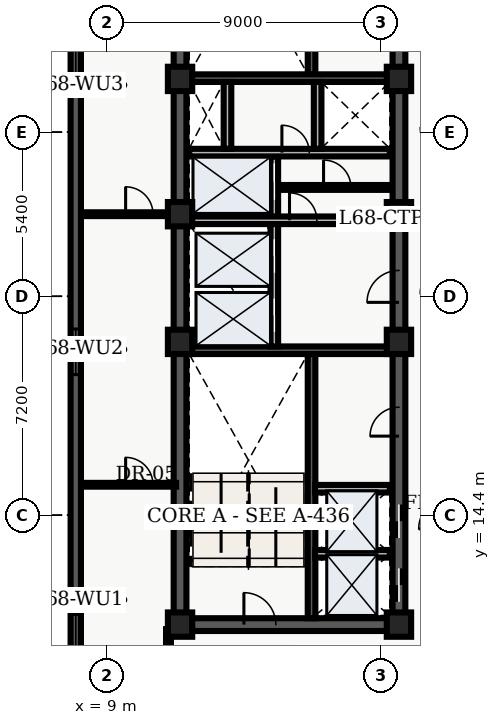
"""IFC4 building model, lengths in metres.
Left out: names, types, materials, properties, quantities, classifications, styles, units other than length and angle.
Written with IfcOpenShell. Run it as: python <this file> out.ifc"""

import sys

from ifc_helpers import new_model, entity, si_unit, converted_unit, direction, frame, origin_with_axes, origin_2d_with_axis, place, context, subcontext, project, spatial, polyline, rectangle, outline, extrude, element, fill, save


model = new_model("IFC4")
c1 = context("Model", 3, precision=1e-05, world=origin_with_axes(), true_north=direction((0.0, 1.0)))
c2 = subcontext(c1, "Body", "Model", "MODEL_VIEW")
j1 = project(units=[si_unit("LENGTHUNIT", "METRE"), converted_unit("PLANEANGLEUNIT", "DEGREE", entity("IfcPlaneAngleMeasure", 0.017), si_unit("PLANEANGLEUNIT", "RADIAN"), dimensions=[0, 0, 0, 0, 0, 0, 0])], contexts=[c1])
p1 = place(None, origin_with_axes())
s1 = spatial("IfcSite", under=j1, at=p1, CompositionType="ELEMENT")
p2 = place(p1, origin_with_axes())
s2 = spatial("IfcBuilding", under=s1, at=p2, CompositionType="ELEMENT")
p3 = place(p2, frame((0.0, 0.0, 276.3), z_axis=(0.0, 0.0, 1.0), x_axis=(1.0, 0.0, 0.0)))
s3 = spatial("IfcBuildingStorey", under=s2, at=p3, CompositionType="ELEMENT", Elevation=276.3)
p4 = place(p3, frame((11.4, 10.8, 0.0), z_axis=(0.0, 0.0, 1.0), x_axis=(0.0, 1.0, 0.0)))
e1 = element("IfcWall", 1, at=p4, inside=s3, PredefinedType="SHEAR", context=c2, shape_type="SweptSolid", body=[
    extrude(outline(polyline([(0.0, -0.21), (27.0, -0.21), (27.0, 0.21), (0.0, 0.21), (0.0, -0.21)])), origin_with_axes(), (0.0, 0.0, 1.0), 3.66),
])
p5 = place(p3, frame((11.4, 10.8, 0.0), z_axis=(0.0, 0.0, 1.0), x_axis=(1.0, 0.0, 0.0)))
e2 = element("IfcWall", 2, at=p5, inside=s3, PredefinedType="SHEAR", context=c2, shape_type="SweptSolid", body=[
    extrude(outline(polyline([(0.0, -0.21), (7.2, -0.21), (7.2, 0.21), (0.0, 0.21), (0.0, -0.21)])), origin_with_axes(), (0.0, 0.0, 1.0), 3.66),
])
p6 = place(p5, frame((2.625, 0.0, 0.0), z_axis=(0.0, 0.0, 1.0), x_axis=(1.0, 0.0, 0.0)))
e3 = element("IfcOpeningElement", 3, at=p6, cuts=e2, PredefinedType="OPENING", context=c2, shape_type="SweptSolid", body=[
    extrude(rectangle(XDim=1.05, YDim=0.44, at=origin_2d_with_axis()), origin_with_axes(), (0.0, 0.0, 1.0), 2.15),
])
p7 = place(p3, frame((18.6, 10.8, 0.0), z_axis=(0.0, 0.0, 1.0), x_axis=(0.0, 1.0, 0.0)))
e4 = element("IfcWall", 4, at=p7, inside=s3, PredefinedType="SHEAR", context=c2, shape_type="SweptSolid", body=[
    extrude(outline(polyline([(0.0, -0.21), (13.5, -0.21), (13.5, 0.21), (0.0, 0.21), (0.0, -0.21)])), origin_with_axes(), (0.0, 0.0, 1.0), 3.66),
])
p8 = place(p7, frame((1.3, 0.0, 0.0), z_axis=(0.0, 0.0, 1.0), x_axis=(1.0, 0.0, 0.0)))
e5 = element("IfcOpeningElement", 5, at=p8, cuts=e4, PredefinedType="OPENING", context=c2, shape_type="SweptSolid", body=[
    extrude(rectangle(XDim=1.1, YDim=0.44, at=origin_2d_with_axis()), origin_with_axes(), (0.0, 0.0, 1.0), 2.15),
])
p9 = place(p7, frame((3.4, 0.0, 0.0), z_axis=(0.0, 0.0, 1.0), x_axis=(1.0, 0.0, 0.0)))
e6 = element("IfcOpeningElement", 6, at=p9, cuts=e4, PredefinedType="OPENING", context=c2, shape_type="SweptSolid", body=[
    extrude(rectangle(XDim=1.1, YDim=0.44, at=origin_2d_with_axis()), origin_with_axes(), (0.0, 0.0, 1.0), 2.15),
])
p10 = place(p7, frame((11.125, 0.0, 0.0), z_axis=(0.0, 0.0, 1.0), x_axis=(1.0, 0.0, 0.0)))
e7 = element("IfcOpeningElement", 7, at=p10, cuts=e4, PredefinedType="OPENING", context=c2, shape_type="SweptSolid", body=[
    extrude(rectangle(XDim=1.05, YDim=0.44, at=origin_2d_with_axis()), origin_with_axes(), (0.0, 0.0, 1.0), 2.15),
])
p11 = place(p7, frame((6.675, 0.0, 0.0), z_axis=(0.0, 0.0, 1.0), x_axis=(1.0, 0.0, 0.0)))
e8 = element("IfcOpeningElement", 8, at=p11, cuts=e4, PredefinedType="OPENING", context=c2, shape_type="SweptSolid", body=[
    extrude(rectangle(XDim=0.95, YDim=0.44, at=origin_2d_with_axis()), origin_with_axes(), (0.0, 0.0, 1.0), 2.15),
])
p12 = place(p3, frame((18.6, 24.3, 0.0), z_axis=(0.0, 0.0, 1.0), x_axis=(0.0, 1.0, 0.0)))
e9 = element("IfcWall", 9, at=p12, inside=s3, PredefinedType="SHEAR", context=c2, shape_type="SweptSolid", body=[
    extrude(outline(polyline([(0.0, -0.21), (13.5, -0.21), (13.5, 0.21), (0.0, 0.21), (0.0, -0.21)])), origin_with_axes(), (0.0, 0.0, 1.0), 3.66),
])
p13 = place(p12, frame((6.275, 0.0, 0.0), z_axis=(0.0, 0.0, 1.0), x_axis=(1.0, 0.0, 0.0)))
e10 = element("IfcOpeningElement", 10, at=p13, cuts=e9, PredefinedType="OPENING", context=c2, shape_type="SweptSolid", body=[
    extrude(rectangle(XDim=0.95, YDim=0.44, at=origin_2d_with_axis()), origin_with_axes(), (0.0, 0.0, 1.0), 2.15),
])
p14 = place(p12, frame((10.875, 0.0, 0.0), z_axis=(0.0, 0.0, 1.0), x_axis=(1.0, 0.0, 0.0)))
e11 = element("IfcOpeningElement", 11, at=p14, cuts=e9, PredefinedType="OPENING", context=c2, shape_type="SweptSolid", body=[
    extrude(rectangle(XDim=0.95, YDim=0.44, at=origin_2d_with_axis()), origin_with_axes(), (0.0, 0.0, 1.0), 2.15),
])
p15 = place(p3, frame((15.725, 11.01, 0.0), z_axis=(0.0, 0.0, 1.0), x_axis=(0.0, 1.0, 0.0)))
e12 = element("IfcWall", 12, at=p15, inside=s3, PredefinedType="SHEAR", context=c2, shape_type="SweptSolid", body=[
    extrude(outline(polyline([(0.0, -0.125), (8.69, -0.125), (8.69, 0.125), (0.0, 0.125), (0.0, -0.125)])), origin_with_axes(), (0.0, 0.0, 1.0), 3.66),
])
p16 = place(p3, frame((11.61, 19.825, 0.0), z_axis=(0.0, 0.0, 1.0), x_axis=(1.0, 0.0, 0.0)))
e13 = element("IfcWall", 13, at=p16, inside=s3, PredefinedType="SHEAR", context=c2, shape_type="SweptSolid", body=[
    extrude(outline(polyline([(0.0, -0.125), (6.78, -0.125), (6.78, 0.125), (0.0, 0.125), (0.0, -0.125)])), origin_with_axes(), (0.0, 0.0, 1.0), 3.66),
])
p17 = place(p3, frame((15.725, 28.9, 0.0), z_axis=(0.0, 0.0, 1.0), x_axis=(0.0, 1.0, 0.0)))
e14 = element("IfcWall", 14, at=p17, inside=s3, PredefinedType="SHEAR", context=c2, shape_type="SweptSolid", body=[
    extrude(outline(polyline([(0.0, -0.125), (8.69, -0.125), (8.69, 0.125), (0.0, 0.125), (0.0, -0.125)])), origin_with_axes(), (0.0, 0.0, 1.0), 3.66),
])
p18 = place(p3, frame((11.61, 28.775, 0.0), z_axis=(0.0, 0.0, 1.0), x_axis=(1.0, 0.0, 0.0)))
e15 = element("IfcWall", 15, at=p18, inside=s3, PredefinedType="SHEAR", context=c2, shape_type="SweptSolid", body=[
    extrude(outline(polyline([(0.0, -0.125), (6.78, -0.125), (6.78, 0.125), (0.0, 0.125), (0.0, -0.125)])), origin_with_axes(), (0.0, 0.0, 1.0), 3.66),
])
p19 = place(p3, frame((14.5, 19.95, 0.0), z_axis=(0.0, 0.0, 1.0), x_axis=(0.0, 1.0, 0.0)))
e16 = element("IfcWall", 16, at=p19, inside=s3, PredefinedType="SOLIDWALL", context=c2, shape_type="SweptSolid", body=[
    extrude(outline(polyline([(0.0, -0.125), (6.25, -0.125), (6.25, 0.125), (0.0, 0.125), (0.0, -0.125)])), origin_with_axes(), (0.0, 0.0, 1.0), 2.7),
])
p20 = place(p19, frame((1.025, 0.0, 0.0), z_axis=(0.0, 0.0, 1.0), x_axis=(1.0, 0.0, 0.0)))
e17 = element("IfcOpeningElement", 17, at=p20, cuts=e16, PredefinedType="OPENING", context=c2, shape_type="SweptSolid", body=[
    extrude(rectangle(XDim=1.1, YDim=0.27, at=origin_2d_with_axis()), origin_with_axes(), (0.0, 0.0, 1.0), 2.15),
])
p21 = place(p19, frame((2.975, 0.0, 0.0), z_axis=(0.0, 0.0, 1.0), x_axis=(1.0, 0.0, 0.0)))
e18 = element("IfcOpeningElement", 18, at=p21, cuts=e16, PredefinedType="OPENING", context=c2, shape_type="SweptSolid", body=[
    extrude(rectangle(XDim=1.1, YDim=0.27, at=origin_2d_with_axis()), origin_with_axes(), (0.0, 0.0, 1.0), 2.15),
])
p22 = place(p19, frame((5.425, 0.0, 0.0), z_axis=(0.0, 0.0, 1.0), x_axis=(1.0, 0.0, 0.0)))
e19 = element("IfcOpeningElement", 19, at=p22, cuts=e16, PredefinedType="OPENING", context=c2, shape_type="SweptSolid", body=[
    extrude(rectangle(XDim=1.2, YDim=0.27, at=origin_2d_with_axis()), origin_with_axes(), (0.0, 0.0, 1.0), 2.15),
])
p23 = place(p3, frame((11.7, 24.1, 0.0), z_axis=(0.0, 0.0, 1.0), x_axis=(1.0, 0.0, 0.0)))
e20 = element("IfcWall", 20, at=p23, inside=s3, PredefinedType="SOLIDWALL", context=c2, shape_type="SweptSolid", body=[
    extrude(outline(polyline([(0.0, -0.125), (6.6, -0.125), (6.6, 0.125), (0.0, 0.125), (0.0, -0.125)])), origin_with_axes(), (0.0, 0.0, 1.0), 2.7),
])
p24 = place(p23, frame((3.75, 0.0, 0.0), z_axis=(0.0, 0.0, 1.0), x_axis=(1.0, 0.0, 0.0)))
e21 = element("IfcOpeningElement", 21, at=p24, cuts=e20, PredefinedType="OPENING", context=c2, shape_type="SweptSolid", body=[
    extrude(rectangle(XDim=0.9, YDim=0.27, at=origin_2d_with_axis()), origin_with_axes(), (0.0, 0.0, 1.0), 2.15),
])
p25 = place(p3, frame((11.7, 26.325, 0.0), z_axis=(0.0, 0.0, 1.0), x_axis=(1.0, 0.0, 0.0)))
e22 = element("IfcWall", 22, at=p25, inside=s3, PredefinedType="SOLIDWALL", context=c2, shape_type="SweptSolid", body=[
    extrude(outline(polyline([(0.0, -0.125), (6.6, -0.125), (6.6, 0.125), (0.0, 0.125), (0.0, -0.125)])), origin_with_axes(), (0.0, 0.0, 1.0), 2.7),
])
p26 = place(p25, frame((3.5, 0.0, 0.0), z_axis=(0.0, 0.0, 1.0), x_axis=(1.0, 0.0, 0.0)))
e23 = element("IfcOpeningElement", 23, at=p26, cuts=e22, PredefinedType="OPENING", context=c2, shape_type="SweptSolid", body=[
    extrude(rectangle(XDim=0.9, YDim=0.27, at=origin_2d_with_axis()), origin_with_axes(), (0.0, 0.0, 1.0), 2.15),
])
for number, where, z_axis, x_axis in (
    (24, (12.96, 26.45, 0.0), (0.0, 0.0, 1.0), (0.0, 1.0, 0.0)),
    (25, (15.925, 26.45, 0.0), (0.0, 0.0, 1.0), (0.0, 1.0, 0.0)),
):
    element("IfcWall", number, at=place(p3, frame(where, z_axis=z_axis, x_axis=x_axis)), inside=s3, PredefinedType="SOLIDWALL", context=c2, shape_type="SweptSolid", body=[
        extrude(outline(polyline([(0.0, -0.125), (2.2, -0.125), (2.2, 0.125), (0.0, 0.125), (0.0, -0.125)])), origin_with_axes(), (0.0, 0.0, 1.0), 2.7),
    ])
for number, where, z_axis, x_axis in (
    (26, (11.4, 10.8, 0.0), (0.0, 0.0, 1.0), (1.0, 0.0, 0.0)),
    (27, (11.4, 20.1, 0.0), (0.0, 0.0, 1.0), (1.0, 0.0, 0.0)),
    (28, (11.4, 24.3, 0.0), (0.0, 0.0, 1.0), (1.0, 0.0, 0.0)),
    (29, (11.4, 28.75, 0.0), (0.0, 0.0, 1.0), (1.0, 0.0, 0.0)),
    (30, (18.6, 10.8, 0.0), (0.0, 0.0, 1.0), (1.0, 0.0, 0.0)),
    (31, (18.6, 20.1, 0.0), (0.0, 0.0, 1.0), (1.0, 0.0, 0.0)),
    (32, (18.6, 24.3, 0.0), (0.0, 0.0, 1.0), (1.0, 0.0, 0.0)),
    (33, (18.6, 28.75, 0.0), (0.0, 0.0, 1.0), (1.0, 0.0, 0.0)),
):
    element("IfcColumn", number, at=place(p3, frame(where, z_axis=z_axis, x_axis=x_axis)), inside=s3, PredefinedType="COLUMN", context=c2, shape_type="SweptSolid", body=[
        extrude(rectangle(XDim=0.8, YDim=0.8, at=origin_2d_with_axis()), origin_with_axes(), (0.0, 0.0, 1.0), 3.9),
    ])
p27 = place(p3, frame((14.62, 25.18, 0.0), z_axis=(0.0, 0.0, 1.0), x_axis=(1.0, 0.0, 0.0)))
e34 = element("IfcWall", 34, at=p27, inside=s3, PredefinedType="PARTITIONING", context=c2, shape_type="SweptSolid", body=[
    extrude(outline(polyline([(0.0, -0.08), (3.68, -0.08), (3.68, 0.08), (0.0, 0.08), (0.0, -0.08)])), origin_with_axes(), (0.0, 0.0, 1.0), 2.7),
])
p28 = place(p27, frame((1.95, 0.0, 0.0), z_axis=(0.0, 0.0, 1.0), x_axis=(1.0, 0.0, 0.0)))
e35 = element("IfcOpeningElement", 35, at=p28, cuts=e34, PredefinedType="OPENING", context=c2, shape_type="SweptSolid", body=[
    extrude(rectangle(XDim=0.9, YDim=0.18, at=origin_2d_with_axis()), origin_with_axes(), (0.0, 0.0, 1.0), 2.15),
])
for number, where, z_axis, x_axis in (
    (36, (15.84, 13.13, 0.0), (0.0, 0.0, 1.0), (1.0, 0.0, 0.0)),
    (37, (15.84, 15.27, 0.0), (0.0, 0.0, 1.0), (1.0, 0.0, 0.0)),
):
    element("IfcWall", number, at=place(p3, frame(where, z_axis=z_axis, x_axis=x_axis)), inside=s3, PredefinedType="SOLIDWALL", context=c2, shape_type="SweptSolid", body=[
        extrude(outline(polyline([(0.0, -0.125), (2.46, -0.125), (2.46, 0.125), (0.0, 0.125), (0.0, -0.125)])), origin_with_axes(), (0.0, 0.0, 1.0), 2.7),
    ])
p29 = place(p3, frame((11.02, 7.8, 0.0), z_axis=(0.0, 0.0, 1.0), x_axis=(0.0, 1.0, 0.0)))
e38 = element("IfcWall", 38, at=p29, inside=s3, PredefinedType="PARTITIONING", context=c2, shape_type="SweptSolid", body=[
    extrude(outline(polyline([(0.0, -0.08), (2.85, -0.08), (2.85, 0.08), (0.0, 0.08), (0.0, -0.08)])), origin_with_axes(), (0.0, 0.0, 1.0), 2.7),
])
p30 = place(p29, frame((1.0, 0.0, 0.0), z_axis=(0.0, 0.0, 1.0), x_axis=(1.0, 0.0, 0.0)))
e39 = element("IfcOpeningElement", 39, at=p30, cuts=e38, PredefinedType="OPENING", context=c2, shape_type="SweptSolid", body=[
    extrude(rectangle(XDim=0.9, YDim=0.18, at=origin_2d_with_axis()), origin_with_axes(), (0.0, 0.0, 1.0), 2.15),
])
p31 = place(p3, frame((8.135, 15.4, 0.0), z_axis=(0.0, 0.0, 1.0), x_axis=(1.0, 0.0, 0.0)))
e40 = element("IfcWall", 40, at=p31, inside=s3, PredefinedType="PARTITIONING", context=c2, shape_type="SweptSolid", body=[
    extrude(outline(polyline([(0.0, -0.062), (3.135, -0.062), (3.135, 0.062), (0.0, 0.062), (0.0, -0.062)])), origin_with_axes(), (0.0, 0.0, 1.0), 2.7),
])
p32 = place(p31, frame((1.925, 0.0, 0.0), z_axis=(0.0, 0.0, 1.0), x_axis=(1.0, 0.0, 0.0)))
e41 = element("IfcOpeningElement", 41, at=p32, cuts=e40, PredefinedType="OPENING", context=c2, shape_type="SweptSolid", body=[
    extrude(rectangle(XDim=0.9, YDim=0.145, at=origin_2d_with_axis()), origin_with_axes(), (0.0, 0.0, 1.0), 2.15),
])
p33 = place(p3, frame((8.135, 24.3, 0.0), z_axis=(0.0, 0.0, 1.0), x_axis=(1.0, 0.0, 0.0)))
e42 = element("IfcWall", 42, at=p33, inside=s3, PredefinedType="PARTITIONING", context=c2, shape_type="SweptSolid", body=[
    extrude(outline(polyline([(0.0, -0.062), (3.135, -0.062), (3.135, 0.062), (0.0, 0.062), (0.0, -0.062)])), origin_with_axes(), (0.0, 0.0, 1.0), 2.7),
])
p34 = place(p33, frame((1.925, 0.0, 0.0), z_axis=(0.0, 0.0, 1.0), x_axis=(1.0, 0.0, 0.0)))
e43 = element("IfcOpeningElement", 43, at=p34, cuts=e42, PredefinedType="OPENING", context=c2, shape_type="SweptSolid", body=[
    extrude(rectangle(XDim=0.9, YDim=0.145, at=origin_2d_with_axis()), origin_with_axes(), (0.0, 0.0, 1.0), 2.15),
])
p35 = place(p3, frame((7.97, 2.74, 0.0), z_axis=(0.0, 0.0, 1.0), x_axis=(0.0, 1.0, 0.0)))
e44 = element("IfcWall", 44, at=p35, inside=s3, PredefinedType="SOLIDWALL", context=c2, shape_type="SweptSolid", body=[
    extrude(outline(polyline([(0.0, -0.17), (43.46, -0.17), (43.46, 0.17), (0.0, 0.17), (0.0, -0.17)])), origin_with_axes(), (0.0, 0.0, 1.0), 3.66),
])
p36 = place(p35, frame((2.948, 0.0, 0.45), z_axis=(0.0, 0.0, 1.0), x_axis=(1.0, 0.0, 0.0)))
e45 = element("IfcOpeningElement", 45, at=p36, cuts=e44, PredefinedType="OPENING", context=c2, shape_type="SweptSolid", body=[
    extrude(rectangle(XDim=1.5, YDim=0.36, at=origin_2d_with_axis()), origin_with_axes(), (0.0, 0.0, 1.0), 2.1),
])
p37 = place(p35, frame((7.643, 0.0, 0.45), z_axis=(0.0, 0.0, 1.0), x_axis=(1.0, 0.0, 0.0)))
e46 = element("IfcOpeningElement", 46, at=p37, cuts=e44, PredefinedType="OPENING", context=c2, shape_type="SweptSolid", body=[
    extrude(rectangle(XDim=1.5, YDim=0.36, at=origin_2d_with_axis()), origin_with_axes(), (0.0, 0.0, 1.0), 2.1),
])
p38 = place(p35, frame((17.034, 0.0, 0.45), z_axis=(0.0, 0.0, 1.0), x_axis=(1.0, 0.0, 0.0)))
e47 = element("IfcOpeningElement", 47, at=p38, cuts=e44, PredefinedType="OPENING", context=c2, shape_type="SweptSolid", body=[
    extrude(rectangle(XDim=1.5, YDim=0.36, at=origin_2d_with_axis()), origin_with_axes(), (0.0, 0.0, 1.0), 2.1),
])
p39 = place(p35, frame((26.426, 0.0, 0.45), z_axis=(0.0, 0.0, 1.0), x_axis=(1.0, 0.0, 0.0)))
e48 = element("IfcOpeningElement", 48, at=p39, cuts=e44, PredefinedType="OPENING", context=c2, shape_type="SweptSolid", body=[
    extrude(rectangle(XDim=1.5, YDim=0.36, at=origin_2d_with_axis()), origin_with_axes(), (0.0, 0.0, 1.0), 2.1),
])
p40 = place(p35, frame((31.571, 0.0, 0.45), z_axis=(0.0, 0.0, 1.0), x_axis=(1.0, 0.0, 0.0)))
e49 = element("IfcOpeningElement", 49, at=p40, cuts=e44, PredefinedType="OPENING", context=c2, shape_type="SweptSolid", body=[
    extrude(rectangle(XDim=1.5, YDim=0.36, at=origin_2d_with_axis()), origin_with_axes(), (0.0, 0.0, 1.0), 2.1),
])
p41 = place(p35, frame((35.817, 0.0, 0.45), z_axis=(0.0, 0.0, 1.0), x_axis=(1.0, 0.0, 0.0)))
e50 = element("IfcOpeningElement", 50, at=p41, cuts=e44, PredefinedType="OPENING", context=c2, shape_type="SweptSolid", body=[
    extrude(rectangle(XDim=1.5, YDim=0.36, at=origin_2d_with_axis()), origin_with_axes(), (0.0, 0.0, 1.0), 2.1),
])
p42 = place(p35, frame((40.512, 0.0, 0.45), z_axis=(0.0, 0.0, 1.0), x_axis=(1.0, 0.0, 0.0)))
e51 = element("IfcOpeningElement", 51, at=p42, cuts=e44, PredefinedType="OPENING", context=c2, shape_type="SweptSolid", body=[
    extrude(rectangle(XDim=1.5, YDim=0.36, at=origin_2d_with_axis()), origin_with_axes(), (0.0, 0.0, 1.0), 2.1),
])
p43 = place(p7, frame((1.3, 0.0, 0.0), z_axis=(0.0, 0.0, 1.0), x_axis=(1.0, 0.0, 0.0)))
e52 = element("IfcDoor", 52, at=p43, inside=s3, OperationType="SLIDING_TO_LEFT", PredefinedType="DOOR", context=c2, shape_type="SweptSolid", body=[
    extrude(rectangle(XDim=1.1, YDim=0.09, at=origin_2d_with_axis()), origin_with_axes(), (0.0, 0.0, 1.0), 2.15),
])
fill(e5, e52)
p44 = place(p7, frame((3.4, 0.0, 0.0), z_axis=(0.0, 0.0, 1.0), x_axis=(1.0, 0.0, 0.0)))
e53 = element("IfcDoor", 53, at=p44, inside=s3, OperationType="SLIDING_TO_RIGHT", PredefinedType="DOOR", context=c2, shape_type="SweptSolid", body=[
    extrude(rectangle(XDim=1.1, YDim=0.09, at=origin_2d_with_axis()), origin_with_axes(), (0.0, 0.0, 1.0), 2.15),
])
fill(e6, e53)
p45 = place(p19, frame((1.025, 0.0, 0.0), z_axis=(0.0, 0.0, 1.0), x_axis=(1.0, 0.0, 0.0)))
e54 = element("IfcDoor", 54, at=p45, inside=s3, OperationType="SLIDING_TO_LEFT", PredefinedType="DOOR", context=c2, shape_type="SweptSolid", body=[
    extrude(rectangle(XDim=1.1, YDim=0.09, at=origin_2d_with_axis()), origin_with_axes(), (0.0, 0.0, 1.0), 2.15),
])
fill(e17, e54)
p46 = place(p19, frame((2.975, 0.0, 0.0), z_axis=(0.0, 0.0, 1.0), x_axis=(1.0, 0.0, 0.0)))
e55 = element("IfcDoor", 55, at=p46, inside=s3, OperationType="SLIDING_TO_RIGHT", PredefinedType="DOOR", context=c2, shape_type="SweptSolid", body=[
    extrude(rectangle(XDim=1.1, YDim=0.09, at=origin_2d_with_axis()), origin_with_axes(), (0.0, 0.0, 1.0), 2.15),
])
fill(e18, e55)
p47 = place(p19, frame((5.425, 0.0, 0.0), z_axis=(0.0, 0.0, 1.0), x_axis=(1.0, 0.0, 0.0)))
e56 = element("IfcDoor", 56, at=p47, inside=s3, OperationType="DOUBLE_DOOR_SLIDING", PredefinedType="DOOR", context=c2, shape_type="SweptSolid", body=[
    extrude(rectangle(XDim=1.2, YDim=0.09, at=origin_2d_with_axis()), origin_with_axes(), (0.0, 0.0, 1.0), 2.15),
])
fill(e19, e56)
p48 = place(p5, frame((2.625, 0.0, 0.0), z_axis=(0.0, 0.0, 1.0), x_axis=(1.0, 0.0, 0.0)))
e57 = element("IfcDoor", 57, at=p48, inside=s3, OperationType="SINGLE_SWING_LEFT", PredefinedType="DOOR", context=c2, shape_type="SweptSolid", body=[
    extrude(rectangle(XDim=1.05, YDim=0.09, at=origin_2d_with_axis()), origin_with_axes(), (0.0, 0.0, 1.0), 2.15),
])
fill(e3, e57)
p49 = place(p7, frame((11.125, 0.0, 0.0), z_axis=(0.0, 0.0, 1.0), x_axis=(1.0, 0.0, 0.0)))
e58 = element("IfcDoor", 58, at=p49, inside=s3, OperationType="SINGLE_SWING_LEFT", PredefinedType="DOOR", context=c2, shape_type="SweptSolid", body=[
    extrude(rectangle(XDim=1.05, YDim=0.09, at=origin_2d_with_axis()), origin_with_axes(), (0.0, 0.0, 1.0), 2.15),
])
fill(e7, e58)
p50 = place(p25, frame((3.5, 0.0, 0.0), z_axis=(0.0, 0.0, 1.0), x_axis=(1.0, 0.0, 0.0)))
e59 = element("IfcDoor", 59, at=p50, inside=s3, OperationType="SINGLE_SWING_LEFT", PredefinedType="DOOR", context=c2, shape_type="SweptSolid", body=[
    extrude(rectangle(XDim=0.9, YDim=0.09, at=origin_2d_with_axis()), origin_with_axes(), (0.0, 0.0, 1.0), 2.15),
])
fill(e23, e59)
p51 = place(p23, frame((3.75, 0.0, 0.0), z_axis=(0.0, 0.0, 1.0), x_axis=(1.0, 0.0, 0.0)))
e60 = element("IfcDoor", 60, at=p51, inside=s3, OperationType="SINGLE_SWING_LEFT", PredefinedType="DOOR", context=c2, shape_type="SweptSolid", body=[
    extrude(rectangle(XDim=0.9, YDim=0.09, at=origin_2d_with_axis()), origin_with_axes(), (0.0, 0.0, 1.0), 2.15),
])
fill(e21, e60)
p52 = place(p27, frame((1.95, 0.0, 0.0), z_axis=(0.0, 0.0, 1.0), x_axis=(1.0, 0.0, 0.0)))
e61 = element("IfcDoor", 61, at=p52, inside=s3, OperationType="SINGLE_SWING_LEFT", PredefinedType="DOOR", context=c2, shape_type="SweptSolid", body=[
    extrude(rectangle(XDim=0.9, YDim=0.09, at=origin_2d_with_axis()), origin_with_axes(), (0.0, 0.0, 1.0), 2.15),
])
fill(e35, e61)
p53 = place(p7, frame((6.675, 0.0, 0.0), z_axis=(0.0, 0.0, 1.0), x_axis=(1.0, 0.0, 0.0)))
e62 = element("IfcDoor", 62, at=p53, inside=s3, OperationType="SINGLE_SWING_LEFT", PredefinedType="DOOR", context=c2, shape_type="SweptSolid", body=[
    extrude(rectangle(XDim=0.95, YDim=0.09, at=origin_2d_with_axis()), origin_with_axes(), (0.0, 0.0, 1.0), 2.15),
])
fill(e8, e62)
p54 = place(p31, frame((1.925, 0.0, 0.0), z_axis=(0.0, 0.0, 1.0), x_axis=(1.0, 0.0, 0.0)))
e63 = element("IfcDoor", 63, at=p54, inside=s3, OperationType="SINGLE_SWING_LEFT", PredefinedType="DOOR", context=c2, shape_type="SweptSolid", body=[
    extrude(rectangle(XDim=0.9, YDim=0.075, at=origin_2d_with_axis()), origin_with_axes(), (0.0, 0.0, 1.0), 2.15),
])
fill(e41, e63)
p55 = place(p33, frame((1.925, 0.0, 0.0), z_axis=(0.0, 0.0, 1.0), x_axis=(1.0, 0.0, 0.0)))
e64 = element("IfcDoor", 64, at=p55, inside=s3, OperationType="SINGLE_SWING_LEFT", PredefinedType="DOOR", context=c2, shape_type="SweptSolid", body=[
    extrude(rectangle(XDim=0.9, YDim=0.075, at=origin_2d_with_axis()), origin_with_axes(), (0.0, 0.0, 1.0), 2.15),
])
fill(e43, e64)
p56 = place(p35, frame((7.643, 0.0, 0.45), z_axis=(0.0, 0.0, 1.0), x_axis=(1.0, 0.0, 0.0)))
e65 = element("IfcWindow", 65, at=p56, inside=s3, PredefinedType="WINDOW", context=c2, shape_type="SweptSolid", body=[
    extrude(rectangle(XDim=1.5, YDim=0.09, at=origin_2d_with_axis()), origin_with_axes(), (0.0, 0.0, 1.0), 2.1),
])
fill(e46, e65)
p57 = place(p35, frame((17.034, 0.0, 0.45), z_axis=(0.0, 0.0, 1.0), x_axis=(1.0, 0.0, 0.0)))
e66 = element("IfcWindow", 66, at=p57, inside=s3, PredefinedType="WINDOW", context=c2, shape_type="SweptSolid", body=[
    extrude(rectangle(XDim=1.5, YDim=0.09, at=origin_2d_with_axis()), origin_with_axes(), (0.0, 0.0, 1.0), 2.1),
])
fill(e47, e66)
p58 = place(p35, frame((26.426, 0.0, 0.45), z_axis=(0.0, 0.0, 1.0), x_axis=(1.0, 0.0, 0.0)))
e67 = element("IfcWindow", 67, at=p58, inside=s3, PredefinedType="WINDOW", context=c2, shape_type="SweptSolid", body=[
    extrude(rectangle(XDim=1.5, YDim=0.09, at=origin_2d_with_axis()), origin_with_axes(), (0.0, 0.0, 1.0), 2.1),
])
fill(e48, e67)
save(model, sys.argv[1])
